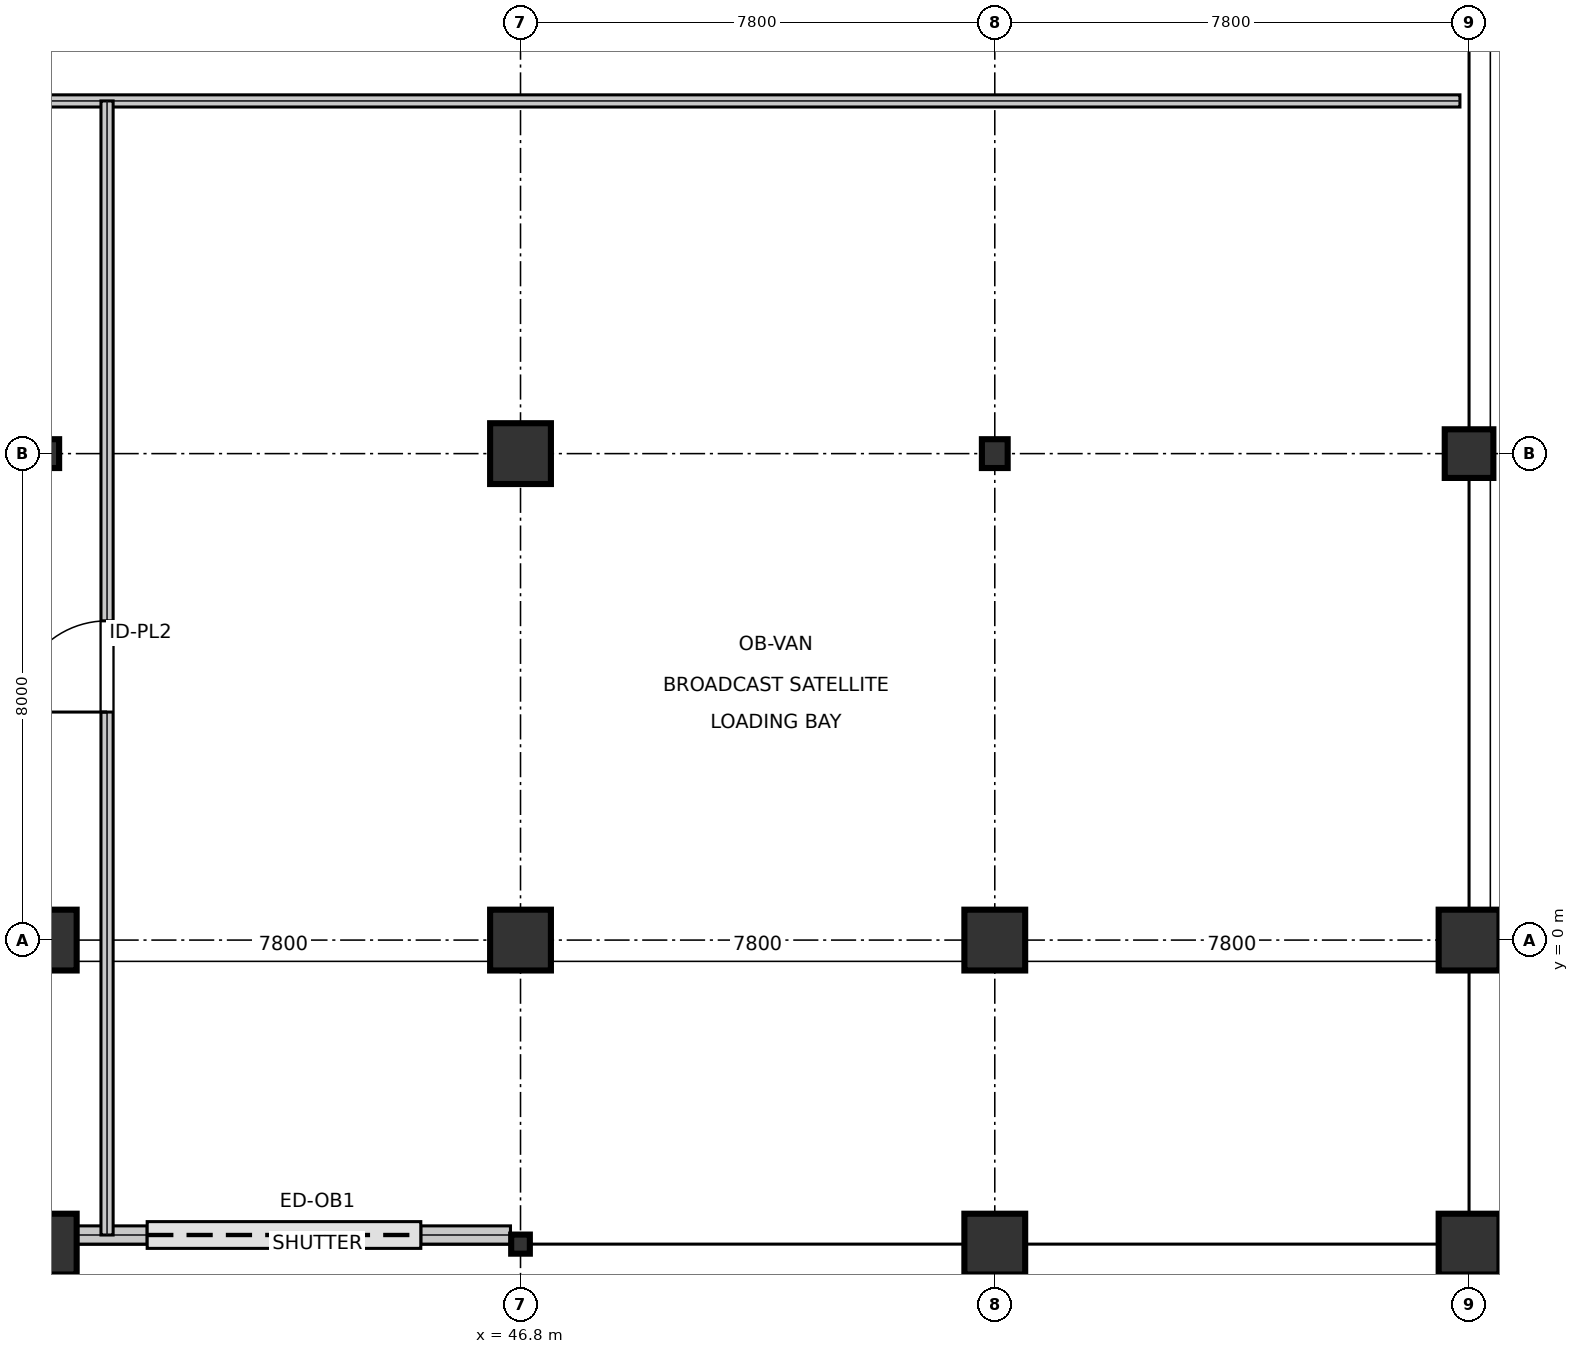
"""IFC4 building model, lengths in metres.
Left out: names, types, materials, properties, quantities, classifications, styles, units other than length and angle.
Written with IfcOpenShell. Run it as: python <this file> out.ifc"""

import sys

from ifc_helpers import new_model, si_unit, direction, frame, frame_2d, origin, origin_2d, place, context, subcontext, project, spatial, rectangle, i_section, extrude, element, fill, save


model = new_model("IFC4")
c1 = context("Model", 3, precision=1e-05, world=origin(), true_north=direction((0.0, 1.0)))
c2 = subcontext(c1, "Body", "Model", "MODEL_VIEW")
j1 = project(units=[si_unit("LENGTHUNIT", "METRE"), si_unit("PLANEANGLEUNIT", "RADIAN")], contexts=[c1])
p1 = place(None, origin())
s1 = spatial("IfcSite", under=j1, at=p1, CompositionType="ELEMENT")
p2 = place(p1, origin())
s2 = spatial("IfcBuilding", under=s1, at=p2, CompositionType="ELEMENT")
p3 = place(p2, origin())
s3 = spatial("IfcBuildingStorey", under=s2, at=p3, CompositionType="ELEMENT", Elevation=0.0)
for number, where, z_axis, x_axis in (
    (1, (39.0, -5.0, 0.0), (0.0, 0.0, 1.0), (1.0, 0.0, 0.0)),
    (2, (39.0, 0.0, 0.0), (0.0, 0.0, 1.0), (1.0, 0.0, 0.0)),
):
    element("IfcColumn", number, at=place(p3, frame(where, z_axis=z_axis, x_axis=x_axis)), inside=s3, PredefinedType="COLUMN", context=c2, shape_type="SweptSolid", body=[
        extrude(rectangle(XDim=1.0, YDim=1.0, at=origin_2d()), origin(), (0.0, 0.0, 1.0), 5.395),
    ])
p4 = place(p3, frame((39.0, 8.0, 0.0), z_axis=(0.0, 0.0, 1.0), x_axis=(1.0, 0.0, 0.0)))
e3 = element("IfcColumn", 3, at=p4, inside=s3, PredefinedType="COLUMN", context=c2, shape_type="SweptSolid", body=[
    extrude(i_section(OverallWidth=0.424, OverallDepth=0.474, WebThickness=0.048, FlangeThickness=0.077, at=origin_2d()), origin(), (0.0, 0.0, 1.0), 5.395),
])
p5 = place(p3, frame((46.8, -5.0, 0.0), z_axis=(0.0, 0.0, 1.0), x_axis=(1.0, 0.0, 0.0)))
e4 = element("IfcColumn", 4, at=p5, inside=s3, PredefinedType="COLUMN", context=c2, shape_type="SweptSolid", body=[
    extrude(i_section(OverallWidth=0.307, OverallDepth=0.314, WebThickness=0.011, FlangeThickness=0.019, at=origin_2d()), origin(), (0.0, 0.0, 1.0), 5.395),
])
for number, where, z_axis, x_axis in (
    (5, (46.8, 0.0, 0.0), (0.0, 0.0, 1.0), (1.0, 0.0, 0.0)),
    (6, (46.8, 8.0, 0.0), (0.0, 0.0, 1.0), (1.0, 0.0, 0.0)),
    (7, (54.6, -5.0, 0.0), (0.0, 0.0, 1.0), (1.0, 0.0, 0.0)),
    (8, (54.6, 0.0, 0.0), (0.0, 0.0, 1.0), (1.0, 0.0, 0.0)),
):
    element("IfcColumn", number, at=place(p3, frame(where, z_axis=z_axis, x_axis=x_axis)), inside=s3, PredefinedType="COLUMN", context=c2, shape_type="SweptSolid", body=[
        extrude(rectangle(XDim=1.0, YDim=1.0, at=origin_2d()), origin(), (0.0, 0.0, 1.0), 5.395),
    ])
p6 = place(p3, frame((54.6, 8.0, 0.0), z_axis=(0.0, 0.0, 1.0), x_axis=(1.0, 0.0, 0.0)))
e9 = element("IfcColumn", 9, at=p6, inside=s3, PredefinedType="COLUMN", context=c2, shape_type="SweptSolid", body=[
    extrude(i_section(OverallWidth=0.424, OverallDepth=0.474, WebThickness=0.048, FlangeThickness=0.077, at=origin_2d()), origin(), (0.0, 0.0, 1.0), 5.395),
])
for number, where, z_axis, x_axis in (
    (10, (62.4, -5.0, 0.0), (0.0, 0.0, 1.0), (1.0, 0.0, 0.0)),
    (11, (62.4, 0.0, 0.0), (0.0, 0.0, 1.0), (1.0, 0.0, 0.0)),
):
    element("IfcColumn", number, at=place(p3, frame(where, z_axis=z_axis, x_axis=x_axis)), inside=s3, PredefinedType="COLUMN", context=c2, shape_type="SweptSolid", body=[
        extrude(rectangle(XDim=1.0, YDim=1.0, at=origin_2d()), origin(), (0.0, 0.0, 1.0), 5.395),
    ])
p7 = place(p3, frame((62.4, 8.0, 0.0), z_axis=(0.0, 0.0, 1.0), x_axis=(1.0, 0.0, 0.0)))
e12 = element("IfcColumn", 12, at=p7, inside=s3, PredefinedType="COLUMN", context=c2, shape_type="SweptSolid", body=[
    extrude(rectangle(XDim=0.8, YDim=0.8, at=origin_2d()), origin(), (0.0, 0.0, 1.0), 5.395),
])
p8 = place(p3, frame((39.51, -4.85, 0.0), z_axis=(0.0, 0.0, 1.0), x_axis=(1.0, 0.0, 0.0)))
e13 = element("IfcWall", 13, at=p8, inside=s3, PredefinedType="STANDARD", context=c2, shape_type="SweptSolid", body=[
    extrude(rectangle(XDim=7.125, YDim=0.3, at=frame_2d((3.562, 0.0))), origin(), (0.0, 0.0, 1.0), 4.415),
])
p9 = place(p8, frame((1.15, 0.0, 0.0)))
e14 = element("IfcOpeningElement", 14, at=p9, cuts=e13, PredefinedType="OPENING", context=c2, shape_type="SweptSolid", body=[
    extrude(rectangle(XDim=4.5, YDim=4.2, at=frame_2d((2.25, 2.1))), frame((0.0, 0.16, 0.0), z_axis=(0.0, -1.0, 0.0), x_axis=(1.0, 0.0, 0.0)), (0.0, 0.0, 1.0), 0.32),
])
p10 = place(p3, frame((37.3, 13.8, 0.0), z_axis=(0.0, 0.0, 1.0), x_axis=(1.0, 0.0, 0.0)))
e15 = element("IfcWall", 15, at=p10, inside=s3, PredefinedType="SOLIDWALL", context=c2, shape_type="SweptSolid", body=[
    extrude(rectangle(XDim=24.95, YDim=0.2, at=frame_2d((12.475, 0.0))), origin(), (0.0, 0.0, 1.0), 4.415),
])
p11 = place(p3, frame((40.0, -4.85, 0.0), z_axis=(0.0, 0.0, 1.0), x_axis=(0.0, 1.0, 0.0)))
e16 = element("IfcWall", 16, at=p11, inside=s3, PredefinedType="SOLIDWALL", context=c2, shape_type="SweptSolid", body=[
    extrude(rectangle(XDim=18.65, YDim=0.2, at=frame_2d((9.325, 0.0))), origin(), (0.0, 0.0, 1.0), 4.338),
])
p12 = place(p11, frame((8.6, 0.0, 0.0)))
e17 = element("IfcOpeningElement", 17, at=p12, cuts=e16, PredefinedType="OPENING", context=c2, shape_type="SweptSolid", body=[
    extrude(rectangle(XDim=1.5, YDim=2.25, at=frame_2d((0.75, 1.125))), frame((0.0, 0.11, 0.0), z_axis=(0.0, -1.0, 0.0), x_axis=(1.0, 0.0, 0.0)), (0.0, 0.0, 1.0), 0.22),
])
p13 = place(p9, origin())
e18 = element("IfcDoor", 18, at=p13, inside=s3, OperationType="ROLLINGUP", PredefinedType="GATE", context=c2, shape_type="SweptSolid", body=[
    extrude(rectangle(XDim=4.5, YDim=4.2, at=frame_2d((2.25, 2.1))), frame((0.0, 0.025, 0.0), z_axis=(0.0, -1.0, 0.0), x_axis=(1.0, 0.0, 0.0)), (0.0, 0.0, 1.0), 0.05),
])
fill(e14, e18)
p14 = place(p12, origin())
e19 = element("IfcDoor", 19, at=p14, inside=s3, OperationType="SINGLE_SWING_LEFT", PredefinedType="DOOR", context=c2, shape_type="SweptSolid", body=[
    extrude(rectangle(XDim=1.5, YDim=2.25, at=frame_2d((0.75, 1.125))), frame((0.0, 0.025, 0.0), z_axis=(0.0, -1.0, 0.0), x_axis=(1.0, 0.0, 0.0)), (0.0, 0.0, 1.0), 0.05),
])
fill(e17, e19)
save(model, sys.argv[1])
